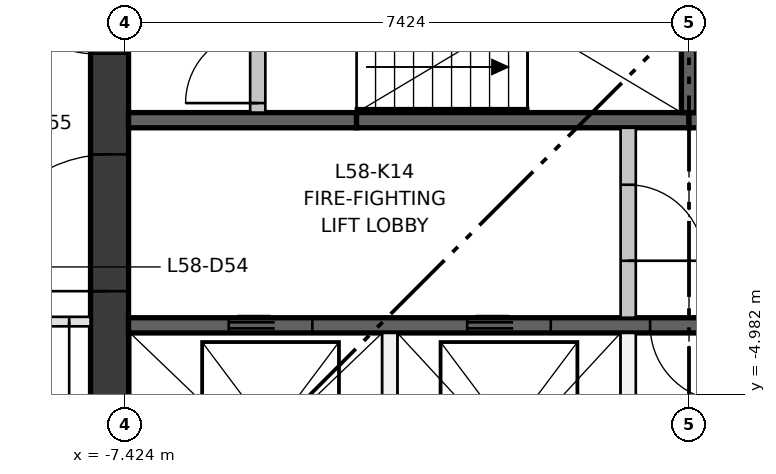
"""IFC4 building model, lengths in metres.
Left out: names, types, materials, properties, quantities, classifications, styles, units other than length and angle.
Written with IfcOpenShell. Run it as: python <this file> out.ifc"""

import sys

from ifc_helpers import new_model, si_unit, direction, frame, frame_2d, origin, place, context, subcontext, project, spatial, rectangle, extrude, element, fill, save


model = new_model("IFC4")
c1 = context("Model", 3, precision=1e-05, world=origin(), true_north=direction((0.0, 1.0)))
c2 = subcontext(c1, "Body", "Model", "MODEL_VIEW")
j1 = project(units=[si_unit("LENGTHUNIT", "METRE"), si_unit("PLANEANGLEUNIT", "RADIAN")], contexts=[c1])
p1 = place(None, origin())
s1 = spatial("IfcSite", under=j1, at=p1, CompositionType="ELEMENT")
p2 = place(p1, origin())
s2 = spatial("IfcBuilding", under=s1, at=p2, CompositionType="ELEMENT")
p3 = place(p2, frame((0.0, 0.0, 214.45)))
s3 = spatial("IfcBuildingStorey", under=s2, at=p3, CompositionType="ELEMENT", Elevation=214.45)
p4 = place(p3, frame((-7.624, -7.374, 0.0), z_axis=(0.0, 0.0, 1.0), x_axis=(0.0, 1.0, 0.0)))
e1 = element("IfcWall", 1, at=p4, inside=s3, PredefinedType="SHEAR", context=c2, shape_type="SweptSolid", body=[
    extrude(rectangle(XDim=14.748, YDim=0.5, at=frame_2d((7.374, 0.0))), origin(), (0.0, 0.0, 1.0), 3.35),
])
p5 = place(p4, frame((6.874, 0.0, 0.0)))
e2 = element("IfcOpeningElement", 2, at=p5, cuts=e1, PredefinedType="OPENING", context=c2, shape_type="SweptSolid", body=[
    extrude(rectangle(XDim=1.0, YDim=2.1, at=frame_2d((0.5, 1.05))), frame((0.0, 0.26, 0.0), z_axis=(0.0, -1.0, 0.0), x_axis=(1.0, 0.0, 0.0)), (0.0, 0.0, 1.0), 0.52),
])
p6 = place(p4, frame((3.75, 0.0, 0.0)))
e3 = element("IfcOpeningElement", 3, at=p6, cuts=e1, PredefinedType="OPENING", context=c2, shape_type="SweptSolid", body=[
    extrude(rectangle(XDim=1.8, YDim=2.1, at=frame_2d((0.9, 1.05))), frame((0.0, 0.26, 0.0), z_axis=(0.0, -1.0, 0.0), x_axis=(1.0, 0.0, 0.0)), (0.0, 0.0, 1.0), 0.52),
])
p7 = place(p4, frame((9.198, 0.0, 0.0)))
e4 = element("IfcOpeningElement", 4, at=p7, cuts=e1, PredefinedType="OPENING", context=c2, shape_type="SweptSolid", body=[
    extrude(rectangle(XDim=1.8, YDim=2.1, at=frame_2d((0.9, 1.05))), frame((0.0, 0.26, 0.0), z_axis=(0.0, -1.0, 0.0), x_axis=(1.0, 0.0, 0.0)), (0.0, 0.0, 1.0), 0.52),
])
p8 = place(p3, frame((-7.374, -4.074, 0.0), z_axis=(0.0, 0.0, 1.0), x_axis=(1.0, 0.0, 0.0)))
e5 = element("IfcWall", 5, at=p8, inside=s3, PredefinedType="SHEAR", context=c2, shape_type="SweptSolid", body=[
    extrude(rectangle(XDim=14.748, YDim=0.2, at=frame_2d((7.374, 0.0))), origin(), (0.0, 0.0, 1.0), 3.0),
])
p9 = place(p8, frame((1.319, 0.0, 0.0)))
e6 = element("IfcOpeningElement", 6, at=p9, cuts=e5, PredefinedType="OPENING", context=c2, shape_type="SweptSolid", body=[
    extrude(rectangle(XDim=1.1, YDim=2.1, at=frame_2d((0.55, 1.05))), frame((0.0, 0.11, 0.0), z_axis=(0.0, -1.0, 0.0), x_axis=(1.0, 0.0, 0.0)), (0.0, 0.0, 1.0), 0.22),
])
p10 = place(p8, frame((4.456, 0.0, 0.0)))
e7 = element("IfcOpeningElement", 7, at=p10, cuts=e5, PredefinedType="OPENING", context=c2, shape_type="SweptSolid", body=[
    extrude(rectangle(XDim=1.1, YDim=2.1, at=frame_2d((0.55, 1.05))), frame((0.0, 0.11, 0.0), z_axis=(0.0, -1.0, 0.0), x_axis=(1.0, 0.0, 0.0)), (0.0, 0.0, 1.0), 0.22),
])
p11 = place(p8, frame((6.862, 0.0, 0.0)))
e8 = element("IfcOpeningElement", 8, at=p11, cuts=e5, PredefinedType="OPENING", context=c2, shape_type="SweptSolid", body=[
    extrude(rectangle(XDim=1.0, YDim=2.1, at=frame_2d((0.5, 1.05))), frame((0.0, 0.11, 0.0), z_axis=(0.0, -1.0, 0.0), x_axis=(1.0, 0.0, 0.0)), (0.0, 0.0, 1.0), 0.22),
])
p12 = place(p8, frame((8.439, 0.0, 0.0)))
e9 = element("IfcOpeningElement", 9, at=p12, cuts=e5, PredefinedType="OPENING", context=c2, shape_type="SweptSolid", body=[
    extrude(rectangle(XDim=1.0, YDim=2.1, at=frame_2d((0.5, 1.05))), frame((0.0, 0.11, 0.0), z_axis=(0.0, -1.0, 0.0), x_axis=(1.0, 0.0, 0.0)), (0.0, 0.0, 1.0), 0.22),
])
p13 = place(p8, frame((10.509, 0.0, 0.0)))
e10 = element("IfcOpeningElement", 10, at=p13, cuts=e5, PredefinedType="OPENING", context=c2, shape_type="SweptSolid", body=[
    extrude(rectangle(XDim=0.8, YDim=2.1, at=frame_2d((0.4, 1.05))), frame((0.0, 0.11, 0.0), z_axis=(0.0, -1.0, 0.0), x_axis=(1.0, 0.0, 0.0)), (0.0, 0.0, 1.0), 0.22),
])
p14 = place(p8, frame((12.969, 0.0, 0.0)))
e11 = element("IfcOpeningElement", 11, at=p14, cuts=e5, PredefinedType="OPENING", context=c2, shape_type="SweptSolid", body=[
    extrude(rectangle(XDim=1.0, YDim=2.1, at=frame_2d((0.5, 1.05))), frame((0.0, 0.11, 0.0), z_axis=(0.0, -1.0, 0.0), x_axis=(1.0, 0.0, 0.0)), (0.0, 0.0, 1.0), 0.22),
])
p15 = place(p3, frame((-7.374, -1.375, 0.0), z_axis=(0.0, 0.0, 1.0), x_axis=(1.0, 0.0, 0.0)))
e12 = element("IfcWall", 12, at=p15, inside=s3, PredefinedType="SHEAR", context=c2, shape_type="SweptSolid", body=[
    extrude(rectangle(XDim=3.0, YDim=0.2, at=frame_2d((1.5, 0.0))), origin(), (0.0, 0.0, 1.0), 3.0),
])
for number, where, z_axis, x_axis in (
    (13, (-4.374, -1.375, 0.0), (0.0, 0.0, 1.0), (1.0, 0.0, 0.0)),
    (14, (0.0, -1.375, 0.0), (0.0, 0.0, 1.0), (1.0, 0.0, 0.0)),
):
    element("IfcWall", number, at=place(p3, frame(where, z_axis=z_axis, x_axis=x_axis)), inside=s3, PredefinedType="SHEAR", context=c2, shape_type="SweptSolid", body=[
        extrude(rectangle(XDim=4.374, YDim=0.2, at=frame_2d((2.187, 0.0))), origin(), (0.0, 0.0, 1.0), 3.0),
    ])
p16 = place(p3, frame((0.0, -1.275, 0.0), z_axis=(0.0, 0.0, 1.0), x_axis=(0.0, 1.0, 0.0)))
e15 = element("IfcWall", 15, at=p16, inside=s3, PredefinedType="SHEAR", context=c2, shape_type="SweptSolid", body=[
    extrude(rectangle(XDim=2.55, YDim=0.2, at=frame_2d((1.275, 0.0))), origin(), (0.0, 0.0, 1.0), 3.0),
])
for number, where, z_axis, x_axis in (
    (16, (-3.937, -7.374, 0.0), (0.0, 0.0, 1.0), (0.0, 1.0, 0.0)),
    (17, (-0.8, -7.374, 0.0), (0.0, 0.0, 1.0), (0.0, 1.0, 0.0)),
):
    element("IfcWall", number, at=place(p3, frame(where, z_axis=z_axis, x_axis=x_axis)), inside=s3, PredefinedType="PARTITIONING", context=c2, shape_type="SweptSolid", body=[
        extrude(rectangle(XDim=3.2, YDim=0.2, at=frame_2d((1.6, 0.0))), origin(), (0.0, 0.0, 1.0), 3.0),
    ])
p17 = place(p3, frame((-0.8, -3.974, 0.0), z_axis=(0.0, 0.0, 1.0), x_axis=(0.0, 1.0, 0.0)))
e18 = element("IfcWall", 18, at=p17, inside=s3, PredefinedType="PARTITIONING", context=c2, shape_type="SweptSolid", body=[
    extrude(rectangle(XDim=2.499, YDim=0.2, at=frame_2d((1.25, 0.0))), origin(), (0.0, 0.0, 1.0), 3.0),
])
p18 = place(p17, frame((0.75, 0.0, 0.0)))
e19 = element("IfcOpeningElement", 19, at=p18, cuts=e18, PredefinedType="OPENING", context=c2, shape_type="SweptSolid", body=[
    extrude(rectangle(XDim=1.0, YDim=2.1, at=frame_2d((0.5, 1.05))), frame((0.0, 0.11, 0.0), z_axis=(0.0, -1.0, 0.0), x_axis=(1.0, 0.0, 0.0)), (0.0, 0.0, 1.0), 0.22),
])
p19 = place(p3, frame((-5.674, -1.275, 0.0), z_axis=(0.0, 0.0, 1.0), x_axis=(0.0, 1.0, 0.0)))
e20 = element("IfcWall", 20, at=p19, inside=s3, PredefinedType="PARTITIONING", context=c2, shape_type="SweptSolid", body=[
    extrude(rectangle(XDim=2.55, YDim=0.2, at=frame_2d((1.275, 0.0))), origin(), (0.0, 0.0, 1.0), 3.0),
])
p20 = place(p19, frame((0.125, 0.0, 0.0)))
e21 = element("IfcOpeningElement", 21, at=p20, cuts=e20, PredefinedType="OPENING", context=c2, shape_type="SweptSolid", body=[
    extrude(rectangle(XDim=0.95, YDim=2.1, at=frame_2d((0.475, 1.05))), frame((0.0, 0.11, 0.0), z_axis=(0.0, -1.0, 0.0), x_axis=(1.0, 0.0, 0.0)), (0.0, 0.0, 1.0), 0.22),
])
p21 = place(p19, frame((1.475, 0.0, 0.0)))
e22 = element("IfcOpeningElement", 22, at=p21, cuts=e20, PredefinedType="OPENING", context=c2, shape_type="SweptSolid", body=[
    extrude(rectangle(XDim=0.95, YDim=2.1, at=frame_2d((0.475, 1.05))), frame((0.0, 0.11, 0.0), z_axis=(0.0, -1.0, 0.0), x_axis=(1.0, 0.0, 0.0)), (0.0, 0.0, 1.0), 0.22),
])
p22 = place(p3, frame((-7.874, -4.024, 0.0), z_axis=(0.0, 0.0, 1.0), x_axis=(-1.0, 0.0, 0.0)))
e23 = element("IfcWall", 23, at=p22, inside=s3, PredefinedType="PARTITIONING", context=c2, shape_type="SweptSolid", body=[
    extrude(rectangle(XDim=1.562, YDim=0.125, at=frame_2d((0.781, 0.0))), origin(), (0.0, 0.0, 1.0), 3.0),
])
p23 = place(p22, frame((0.281, 0.0, 0.0)))
e24 = element("IfcOpeningElement", 24, at=p23, cuts=e23, PredefinedType="OPENING", context=c2, shape_type="SweptSolid", body=[
    extrude(rectangle(XDim=1.0, YDim=2.1, at=frame_2d((0.5, 1.05))), frame((0.0, 0.073, 0.0), z_axis=(0.0, -1.0, 0.0), x_axis=(1.0, 0.0, 0.0)), (0.0, 0.0, 1.0), 0.145),
])
p24 = place(p9, origin())
e25 = element("IfcDoor", 25, at=p24, inside=s3, OperationType="DOUBLE_DOOR_SLIDING", PredefinedType="DOOR", context=c2, shape_type="SweptSolid", body=[
    extrude(rectangle(XDim=1.1, YDim=2.1, at=frame_2d((0.55, 1.05))), frame((0.0, 0.025, 0.0), z_axis=(0.0, -1.0, 0.0), x_axis=(1.0, 0.0, 0.0)), (0.0, 0.0, 1.0), 0.05),
])
fill(e6, e25)
p25 = place(p10, origin())
e26 = element("IfcDoor", 26, at=p25, inside=s3, OperationType="DOUBLE_DOOR_SLIDING", PredefinedType="DOOR", context=c2, shape_type="SweptSolid", body=[
    extrude(rectangle(XDim=1.1, YDim=2.1, at=frame_2d((0.55, 1.05))), frame((0.0, 0.025, 0.0), z_axis=(0.0, -1.0, 0.0), x_axis=(1.0, 0.0, 0.0)), (0.0, 0.0, 1.0), 0.05),
])
fill(e7, e26)
p26 = place(p20, origin())
e27 = element("IfcDoor", 27, at=p26, inside=s3, OperationType="SINGLE_SWING_LEFT", PredefinedType="DOOR", context=c2, shape_type="SweptSolid", body=[
    extrude(rectangle(XDim=0.95, YDim=2.1, at=frame_2d((0.475, 1.05))), frame((0.0, 0.025, 0.0), z_axis=(0.0, -1.0, 0.0), x_axis=(1.0, 0.0, 0.0)), (0.0, 0.0, 1.0), 0.05),
])
fill(e21, e27)
p27 = place(p18, frame((1.0, 0.0, 0.0), z_axis=(0.0, 0.0, 1.0), x_axis=(-1.0, 0.0, 0.0)))
e28 = element("IfcDoor", 28, at=p27, inside=s3, OperationType="SINGLE_SWING_LEFT", PredefinedType="DOOR", context=c2, shape_type="SweptSolid", body=[
    extrude(rectangle(XDim=1.0, YDim=2.1, at=frame_2d((0.5, 1.05))), frame((0.0, 0.025, 0.0), z_axis=(0.0, -1.0, 0.0), x_axis=(1.0, 0.0, 0.0)), (0.0, 0.0, 1.0), 0.05),
])
fill(e19, e28)
p28 = place(p11, frame((1.0, 0.0, 0.0), z_axis=(0.0, 0.0, 1.0), x_axis=(-1.0, 0.0, 0.0)))
e29 = element("IfcDoor", 29, at=p28, inside=s3, OperationType="SINGLE_SWING_RIGHT", PredefinedType="DOOR", context=c2, shape_type="SweptSolid", body=[
    extrude(rectangle(XDim=1.0, YDim=2.1, at=frame_2d((0.5, 1.05))), frame((0.0, 0.025, 0.0), z_axis=(0.0, -1.0, 0.0), x_axis=(1.0, 0.0, 0.0)), (0.0, 0.0, 1.0), 0.05),
])
fill(e8, e29)
p29 = place(p5, origin())
e30 = element("IfcDoor", 30, at=p29, inside=s3, OperationType="SINGLE_SWING_RIGHT", PredefinedType="DOOR", context=c2, shape_type="SweptSolid", body=[
    extrude(rectangle(XDim=1.0, YDim=2.1, at=frame_2d((0.5, 1.05))), frame((0.0, 0.25, 0.0), z_axis=(0.0, -1.0, 0.0), x_axis=(1.0, 0.0, 0.0)), (0.0, 0.0, 1.0), 0.05),
])
fill(e2, e30)
p30 = place(p6, origin())
e31 = element("IfcDoor", 31, at=p30, inside=s3, OperationType="DOUBLE_DOOR_SINGLE_SWING", PredefinedType="DOOR", context=c2, shape_type="SweptSolid", body=[
    extrude(rectangle(XDim=1.8, YDim=2.1, at=frame_2d((0.9, 1.05))), frame((0.0, 0.025, 0.0), z_axis=(0.0, -1.0, 0.0), x_axis=(1.0, 0.0, 0.0)), (0.0, 0.0, 1.0), 0.05),
])
fill(e3, e31)
p31 = place(p23, origin())
e32 = element("IfcDoor", 32, at=p31, inside=s3, OperationType="SINGLE_SWING_LEFT", PredefinedType="DOOR", context=c2, shape_type="SweptSolid", body=[
    extrude(rectangle(XDim=1.0, YDim=2.1, at=frame_2d((0.5, 1.05))), frame((0.0, 0.025, 0.0), z_axis=(0.0, -1.0, 0.0), x_axis=(1.0, 0.0, 0.0)), (0.0, 0.0, 1.0), 0.05),
])
fill(e24, e32)
save(model, sys.argv[1])
